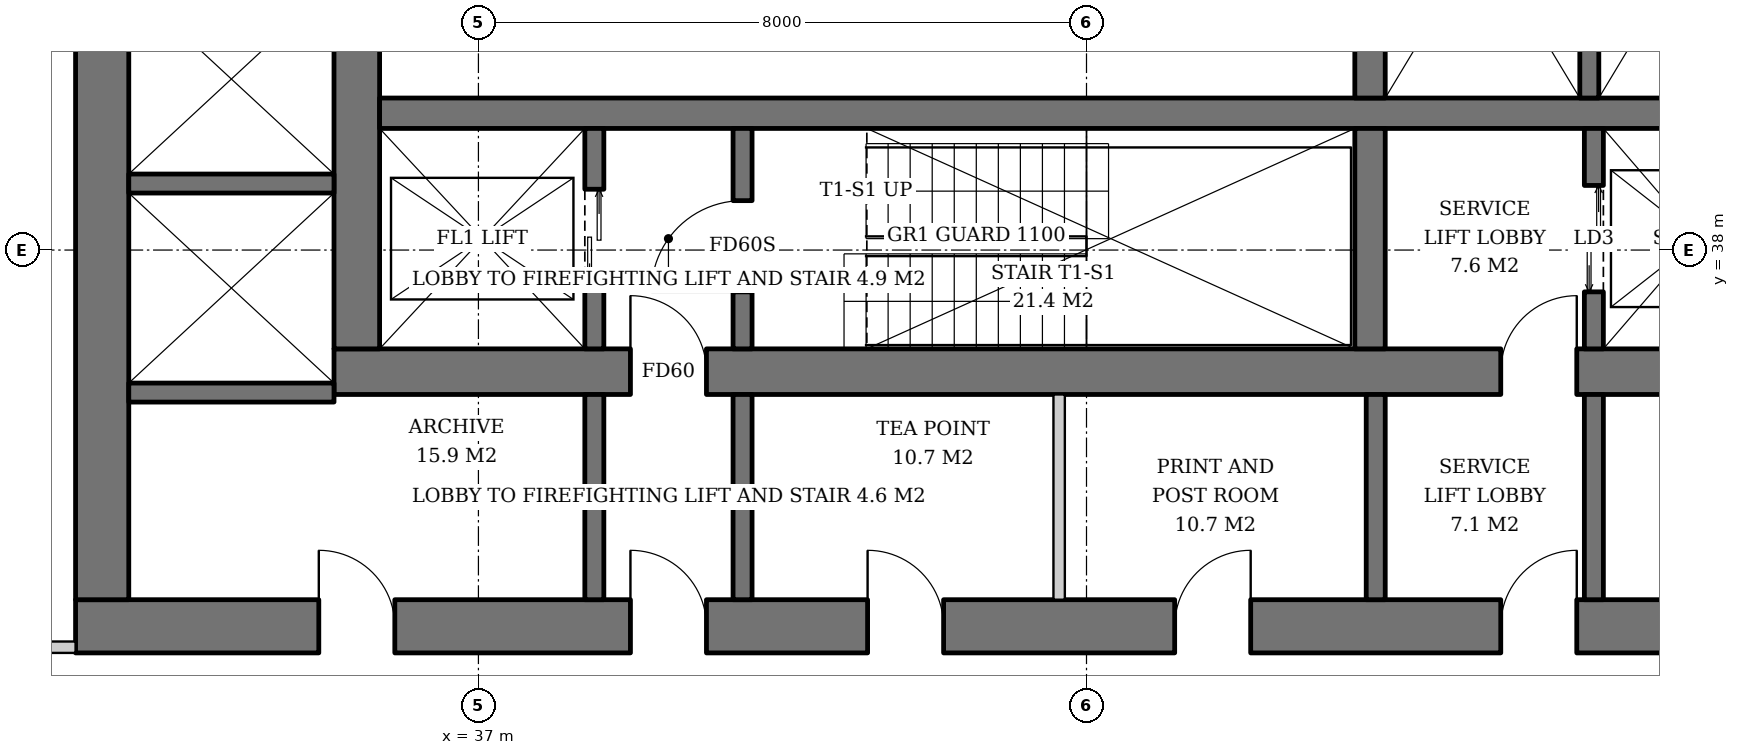
"""IFC4 building model, lengths in metres.
Left out: names, types, materials, properties, quantities, classifications, styles, units other than length and angle.
Written with IfcOpenShell. Run it as: python <this file> out.ifc"""

import sys

from ifc_helpers import new_model, si_unit, direction, frame, frame_2d, origin, place, context, subcontext, project, spatial, rectangle, extrude, element, fill, save


model = new_model("IFC4")
c1 = context("Model", 3, precision=1e-05, world=origin(), true_north=direction((0.0, 1.0)))
c2 = subcontext(c1, "Body", "Model", "MODEL_VIEW")
j1 = project(units=[si_unit("LENGTHUNIT", "METRE"), si_unit("PLANEANGLEUNIT", "RADIAN")], contexts=[c1])
p1 = place(None, origin())
s1 = spatial("IfcSite", under=j1, at=p1, CompositionType="ELEMENT")
p2 = place(p1, origin())
s2 = spatial("IfcBuilding", under=s1, at=p2, CompositionType="ELEMENT")
p3 = place(p2, frame((0.0, 0.0, 97.0)))
s3 = spatial("IfcBuildingStorey", under=s2, at=p3, CompositionType="ELEMENT", Elevation=97.0)
p4 = place(p3, frame((35.1, 36.4, 0.0), z_axis=(0.0, 0.0, 1.0), x_axis=(1.0, 0.0, 0.0)))
e1 = element("IfcWall", 1, at=p4, inside=s3, PredefinedType="SHEAR", context=c2, shape_type="SweptSolid", body=[
    extrude(rectangle(XDim=19.8, YDim=0.6, at=frame_2d((9.9, 0.0))), origin(), (0.0, 0.0, 1.0), 3.8),
])
p5 = place(p4, frame((3.9, 0.0, 0.0)))
e2 = element("IfcOpeningElement", 2, at=p5, cuts=e1, PredefinedType="OPENING", context=c2, shape_type="SweptSolid", body=[
    extrude(rectangle(XDim=1.0, YDim=2.1, at=frame_2d((0.5, 1.05))), frame((0.0, 0.31, 0.0), z_axis=(0.0, -1.0, 0.0), x_axis=(1.0, 0.0, 0.0)), (0.0, 0.0, 1.0), 0.62),
])
p6 = place(p4, frame((15.35, 0.0, 0.0)))
e3 = element("IfcOpeningElement", 3, at=p6, cuts=e1, PredefinedType="OPENING", context=c2, shape_type="SweptSolid", body=[
    extrude(rectangle(XDim=1.0, YDim=2.1, at=frame_2d((0.5, 1.05))), frame((0.0, 0.31, 0.0), z_axis=(0.0, -1.0, 0.0), x_axis=(1.0, 0.0, 0.0)), (0.0, 0.0, 1.0), 0.62),
])
p7 = place(p3, frame((35.4, 36.7, 0.0), z_axis=(0.0, 0.0, 1.0), x_axis=(0.0, 1.0, 0.0)))
e4 = element("IfcWall", 4, at=p7, inside=s3, PredefinedType="SHEAR", context=c2, shape_type="SweptSolid", body=[
    extrude(rectangle(XDim=18.6, YDim=0.6, at=frame_2d((9.3, 0.0))), origin(), (0.0, 0.0, 1.0), 3.8),
])
p8 = place(p7, frame((8.4, 0.0, 0.0)))
e5 = element("IfcOpeningElement", 5, at=p8, cuts=e4, PredefinedType="OPENING", context=c2, shape_type="SweptSolid", body=[
    extrude(rectangle(XDim=1.8, YDim=2.4, at=frame_2d((0.9, 1.2))), frame((0.0, 0.31, 0.0), z_axis=(0.0, -1.0, 0.0), x_axis=(1.0, 0.0, 0.0)), (0.0, 0.0, 1.0), 0.62),
])
p9 = place(p3, frame((31.7, 33.05, 0.0), z_axis=(0.0, 0.0, 1.0), x_axis=(1.0, 0.0, 0.0)))
e6 = element("IfcWall", 6, at=p9, inside=s3, PredefinedType="SHEAR", context=c2, shape_type="SweptSolid", body=[
    extrude(rectangle(XDim=26.6, YDim=0.7, at=frame_2d((13.3, 0.0))), origin(), (0.0, 0.0, 1.0), 3.8),
])
p10 = place(p9, frame((7.3, 0.0, 0.0)))
e7 = element("IfcOpeningElement", 7, at=p10, cuts=e6, PredefinedType="OPENING", context=c2, shape_type="SweptSolid", body=[
    extrude(rectangle(XDim=1.0, YDim=2.1, at=frame_2d((0.5, 1.05))), frame((0.0, 0.36, 0.0), z_axis=(0.0, -1.0, 0.0), x_axis=(1.0, 0.0, 0.0)), (0.0, 0.0, 1.0), 0.72),
])
p11 = place(p9, frame((18.75, 0.0, 0.0)))
e8 = element("IfcOpeningElement", 8, at=p11, cuts=e6, PredefinedType="OPENING", context=c2, shape_type="SweptSolid", body=[
    extrude(rectangle(XDim=1.0, YDim=2.1, at=frame_2d((0.5, 1.05))), frame((0.0, 0.36, 0.0), z_axis=(0.0, -1.0, 0.0), x_axis=(1.0, 0.0, 0.0)), (0.0, 0.0, 1.0), 0.72),
])
p12 = place(p9, frame((3.2, 0.0, 0.0)))
e9 = element("IfcOpeningElement", 9, at=p12, cuts=e6, PredefinedType="OPENING", context=c2, shape_type="SweptSolid", body=[
    extrude(rectangle(XDim=1.0, YDim=2.1, at=frame_2d((0.5, 1.05))), frame((0.0, 0.36, 0.0), z_axis=(0.0, -1.0, 0.0), x_axis=(1.0, 0.0, 0.0)), (0.0, 0.0, 1.0), 0.72),
])
p13 = place(p9, frame((10.42, 0.0, 0.0)))
e10 = element("IfcOpeningElement", 10, at=p13, cuts=e6, PredefinedType="OPENING", context=c2, shape_type="SweptSolid", body=[
    extrude(rectangle(XDim=1.0, YDim=2.1, at=frame_2d((0.5, 1.05))), frame((0.0, 0.36, 0.0), z_axis=(0.0, -1.0, 0.0), x_axis=(1.0, 0.0, 0.0)), (0.0, 0.0, 1.0), 0.72),
])
p14 = place(p9, frame((14.46, 0.0, 0.0)))
e11 = element("IfcOpeningElement", 11, at=p14, cuts=e6, PredefinedType="OPENING", context=c2, shape_type="SweptSolid", body=[
    extrude(rectangle(XDim=1.0, YDim=2.1, at=frame_2d((0.5, 1.05))), frame((0.0, 0.36, 0.0), z_axis=(0.0, -1.0, 0.0), x_axis=(1.0, 0.0, 0.0)), (0.0, 0.0, 1.0), 0.72),
])
p15 = place(p9, frame((22.5, 0.0, 0.0)))
e12 = element("IfcOpeningElement", 12, at=p15, cuts=e6, PredefinedType="OPENING", context=c2, shape_type="SweptSolid", body=[
    extrude(rectangle(XDim=1.0, YDim=2.1, at=frame_2d((0.5, 1.05))), frame((0.0, 0.36, 0.0), z_axis=(0.0, -1.0, 0.0), x_axis=(1.0, 0.0, 0.0)), (0.0, 0.0, 1.0), 0.72),
])
p16 = place(p3, frame((32.05, 33.4, 0.0), z_axis=(0.0, 0.0, 1.0), x_axis=(0.0, 1.0, 0.0)))
e13 = element("IfcWall", 13, at=p16, inside=s3, PredefinedType="SHEAR", context=c2, shape_type="SweptSolid", body=[
    extrude(rectangle(XDim=25.2, YDim=0.7, at=frame_2d((12.6, 0.0))), origin(), (0.0, 0.0, 1.0), 3.8),
])
p17 = place(p16, frame((11.7, 0.0, 0.0)))
e14 = element("IfcOpeningElement", 14, at=p17, cuts=e13, PredefinedType="OPENING", context=c2, shape_type="SweptSolid", body=[
    extrude(rectangle(XDim=1.8, YDim=2.4, at=frame_2d((0.9, 1.2))), frame((0.0, 0.36, 0.0), z_axis=(0.0, -1.0, 0.0), x_axis=(1.0, 0.0, 0.0)), (0.0, 0.0, 1.0), 0.72),
])
p18 = place(p3, frame((35.7, 39.8, 0.0), z_axis=(0.0, 0.0, 1.0), x_axis=(1.0, 0.0, 0.0)))
e15 = element("IfcWall", 15, at=p18, inside=s3, PredefinedType="SHEAR", context=c2, shape_type="SweptSolid", body=[
    extrude(rectangle(XDim=18.6, YDim=0.4, at=frame_2d((9.3, 0.0))), origin(), (0.0, 0.0, 1.0), 3.8),
])
p19 = place(p3, frame((48.73, 36.7, 0.0), z_axis=(0.0, 0.0, 1.0), x_axis=(0.0, 1.0, 0.0)))
e16 = element("IfcWall", 16, at=p19, inside=s3, PredefinedType="SHEAR", context=c2, shape_type="SweptSolid", body=[
    extrude(rectangle(XDim=2.9, YDim=0.4, at=frame_2d((1.45, 0.0))), origin(), (0.0, 0.0, 1.0), 3.8),
])
p20 = place(p3, frame((48.73, 40.0, 0.0), z_axis=(0.0, 0.0, 1.0), x_axis=(0.0, 1.0, 0.0)))
e17 = element("IfcWall", 17, at=p20, inside=s3, PredefinedType="SHEAR", context=c2, shape_type="SweptSolid", body=[
    extrude(rectangle(XDim=12.0, YDim=0.4, at=frame_2d((6.0, 0.0))), origin(), (0.0, 0.0, 1.0), 3.8),
])
p21 = place(p3, frame((38.525, 36.7, 0.0), z_axis=(0.0, 0.0, 1.0), x_axis=(0.0, 1.0, 0.0)))
e18 = element("IfcWall", 18, at=p21, inside=s3, PredefinedType="SHEAR", context=c2, shape_type="SweptSolid", body=[
    extrude(rectangle(XDim=2.9, YDim=0.25, at=frame_2d((1.45, 0.0))), origin(), (0.0, 0.0, 1.0), 3.8),
])
p22 = place(p21, frame((0.8, 0.0, 0.0)))
e19 = element("IfcOpeningElement", 19, at=p22, cuts=e18, PredefinedType="OPENING", context=c2, shape_type="SweptSolid", body=[
    extrude(rectangle(XDim=1.3, YDim=2.2, at=frame_2d((0.65, 1.1))), frame((0.0, 0.135, 0.0), z_axis=(0.0, -1.0, 0.0), x_axis=(1.0, 0.0, 0.0)), (0.0, 0.0, 1.0), 0.27),
])
p23 = place(p3, frame((40.475, 36.7, 0.0), z_axis=(0.0, 0.0, 1.0), x_axis=(0.0, 1.0, 0.0)))
e20 = element("IfcWall", 20, at=p23, inside=s3, PredefinedType="SHEAR", context=c2, shape_type="SweptSolid", body=[
    extrude(rectangle(XDim=2.9, YDim=0.25, at=frame_2d((1.45, 0.0))), origin(), (0.0, 0.0, 1.0), 3.8),
])
p24 = place(p23, frame((0.75, 0.0, 0.0)))
e21 = element("IfcOpeningElement", 21, at=p24, cuts=e20, PredefinedType="OPENING", context=c2, shape_type="SweptSolid", body=[
    extrude(rectangle(XDim=1.2, YDim=2.1, at=frame_2d((0.6, 1.05))), frame((0.0, 0.135, 0.0), z_axis=(0.0, -1.0, 0.0), x_axis=(1.0, 0.0, 0.0)), (0.0, 0.0, 1.0), 0.27),
])
p25 = place(p3, frame((51.675, 36.7, 0.0), z_axis=(0.0, 0.0, 1.0), x_axis=(0.0, 1.0, 0.0)))
e22 = element("IfcWall", 22, at=p25, inside=s3, PredefinedType="SHEAR", context=c2, shape_type="SweptSolid", body=[
    extrude(rectangle(XDim=2.9, YDim=0.25, at=frame_2d((1.45, 0.0))), origin(), (0.0, 0.0, 1.0), 3.8),
])
p26 = place(p25, frame((0.75, 0.0, 0.0)))
e23 = element("IfcOpeningElement", 23, at=p26, cuts=e22, PredefinedType="OPENING", context=c2, shape_type="SweptSolid", body=[
    extrude(rectangle(XDim=1.4, YDim=2.4, at=frame_2d((0.7, 1.2))), frame((0.0, 0.135, 0.0), z_axis=(0.0, -1.0, 0.0), x_axis=(1.0, 0.0, 0.0)), (0.0, 0.0, 1.0), 0.27),
])
p27 = place(p3, frame((51.615, 44.25, 0.0), z_axis=(0.0, 0.0, 1.0), x_axis=(0.0, -1.0, 0.0)))
e24 = element("IfcWall", 24, at=p27, inside=s3, PredefinedType="SHEAR", context=c2, shape_type="SweptSolid", body=[
    extrude(rectangle(XDim=4.25, YDim=0.25, at=frame_2d((2.125, 0.0))), origin(), (0.0, 0.0, 1.0), 3.8),
])
for number, where, z_axis, x_axis in (
    (25, (32.4, 36.125, 0.0), (0.0, 0.0, 1.0), (1.0, 0.0, 0.0)),
    (26, (32.4, 38.875, 0.0), (0.0, 0.0, 1.0), (1.0, 0.0, 0.0)),
):
    element("IfcWall", number, at=place(p3, frame(where, z_axis=z_axis, x_axis=x_axis)), inside=s3, PredefinedType="SHEAR", context=c2, shape_type="SweptSolid", body=[
        extrude(rectangle(XDim=2.7, YDim=0.25, at=frame_2d((1.35, 0.0))), origin(), (0.0, 0.0, 1.0), 3.8),
    ])
for number, where, z_axis, x_axis in (
    (27, (38.525, 33.4, 0.0), (0.0, 0.0, 1.0), (0.0, 1.0, 0.0)),
    (28, (40.475, 33.4, 0.0), (0.0, 0.0, 1.0), (0.0, 1.0, 0.0)),
    (29, (48.805, 33.4, 0.0), (0.0, 0.0, 1.0), (0.0, 1.0, 0.0)),
    (30, (51.675, 33.4, 0.0), (0.0, 0.0, 1.0), (0.0, 1.0, 0.0)),
):
    element("IfcWall", number, at=place(p3, frame(where, z_axis=z_axis, x_axis=x_axis)), inside=s3, PredefinedType="SOLIDWALL", context=c2, shape_type="SweptSolid", body=[
        extrude(rectangle(XDim=2.7, YDim=0.25, at=frame_2d((1.35, 0.0))), origin(), (0.0, 0.0, 1.0), 3.62),
    ])
p28 = place(p3, frame((44.64, 33.4, 0.0), z_axis=(0.0, 0.0, 1.0), x_axis=(0.0, 1.0, 0.0)))
e31 = element("IfcWall", 31, at=p28, inside=s3, PredefinedType="SOLIDWALL", context=c2, shape_type="SweptSolid", body=[
    extrude(rectangle(XDim=2.7, YDim=0.15, at=frame_2d((1.35, 0.0))), origin(), (0.0, 0.0, 1.0), 3.62),
])
p29 = place(p3, frame((31.7, 32.775, 0.0), z_axis=(0.0, 0.0, 1.0), x_axis=(-1.0, 0.0, 0.0)))
e32 = element("IfcWall", 32, at=p29, inside=s3, PredefinedType="PARTITIONING", context=c2, shape_type="SweptSolid", body=[
    extrude(rectangle(XDim=2.325, YDim=0.15, at=frame_2d((1.163, 0.0))), origin(), (0.0, 0.0, 1.0), 3.62),
])
p30 = place(p22, origin())
e33 = element("IfcDoor", 33, at=p30, inside=s3, OperationType="DOUBLE_DOOR_SLIDING", PredefinedType="DOOR", context=c2, shape_type="SweptSolid", body=[
    extrude(rectangle(XDim=1.3, YDim=2.2, at=frame_2d((0.65, 1.1))), frame((0.0, 0.025, 0.0), z_axis=(0.0, -1.0, 0.0), x_axis=(1.0, 0.0, 0.0)), (0.0, 0.0, 1.0), 0.05),
])
fill(e19, e33)
p31 = place(p24, origin())
e34 = element("IfcDoor", 34, at=p31, inside=s3, OperationType="SINGLE_SWING_LEFT", PredefinedType="DOOR", context=c2, shape_type="SweptSolid", body=[
    extrude(rectangle(XDim=1.2, YDim=2.1, at=frame_2d((0.6, 1.05))), frame((0.0, 0.025, 0.0), z_axis=(0.0, -1.0, 0.0), x_axis=(1.0, 0.0, 0.0)), (0.0, 0.0, 1.0), 0.05),
])
fill(e21, e34)
p32 = place(p26, origin())
e35 = element("IfcDoor", 35, at=p32, inside=s3, OperationType="DOUBLE_DOOR_SLIDING", PredefinedType="DOOR", context=c2, shape_type="SweptSolid", body=[
    extrude(rectangle(XDim=1.4, YDim=2.4, at=frame_2d((0.7, 1.2))), frame((0.0, 0.025, 0.0), z_axis=(0.0, -1.0, 0.0), x_axis=(1.0, 0.0, 0.0)), (0.0, 0.0, 1.0), 0.05),
])
fill(e23, e35)
p33 = place(p5, origin())
e36 = element("IfcDoor", 36, at=p33, inside=s3, OperationType="SINGLE_SWING_LEFT", PredefinedType="DOOR", context=c2, shape_type="SweptSolid", body=[
    extrude(rectangle(XDim=1.0, YDim=2.1, at=frame_2d((0.5, 1.05))), frame((0.0, 0.025, 0.0), z_axis=(0.0, -1.0, 0.0), x_axis=(1.0, 0.0, 0.0)), (0.0, 0.0, 1.0), 0.05),
])
fill(e2, e36)
p34 = place(p6, origin())
e37 = element("IfcDoor", 37, at=p34, inside=s3, OperationType="SINGLE_SWING_RIGHT", PredefinedType="DOOR", context=c2, shape_type="SweptSolid", body=[
    extrude(rectangle(XDim=1.0, YDim=2.1, at=frame_2d((0.5, 1.05))), frame((0.0, 0.025, 0.0), z_axis=(0.0, -1.0, 0.0), x_axis=(1.0, 0.0, 0.0)), (0.0, 0.0, 1.0), 0.05),
])
fill(e3, e37)
p35 = place(p10, origin())
e38 = element("IfcDoor", 38, at=p35, inside=s3, OperationType="SINGLE_SWING_LEFT", PredefinedType="DOOR", context=c2, shape_type="SweptSolid", body=[
    extrude(rectangle(XDim=1.0, YDim=2.1, at=frame_2d((0.5, 1.05))), frame((0.0, 0.025, 0.0), z_axis=(0.0, -1.0, 0.0), x_axis=(1.0, 0.0, 0.0)), (0.0, 0.0, 1.0), 0.05),
])
fill(e7, e38)
p36 = place(p11, origin())
e39 = element("IfcDoor", 39, at=p36, inside=s3, OperationType="SINGLE_SWING_RIGHT", PredefinedType="DOOR", context=c2, shape_type="SweptSolid", body=[
    extrude(rectangle(XDim=1.0, YDim=2.1, at=frame_2d((0.5, 1.05))), frame((0.0, 0.025, 0.0), z_axis=(0.0, -1.0, 0.0), x_axis=(1.0, 0.0, 0.0)), (0.0, 0.0, 1.0), 0.05),
])
fill(e8, e39)
p37 = place(p12, origin())
e40 = element("IfcDoor", 40, at=p37, inside=s3, OperationType="SINGLE_SWING_LEFT", PredefinedType="DOOR", context=c2, shape_type="SweptSolid", body=[
    extrude(rectangle(XDim=1.0, YDim=2.1, at=frame_2d((0.5, 1.05))), frame((0.0, 0.34, 0.0), z_axis=(0.0, -1.0, 0.0), x_axis=(1.0, 0.0, 0.0)), (0.0, 0.0, 1.0), 0.05),
])
fill(e9, e40)
p38 = place(p13, origin())
e41 = element("IfcDoor", 41, at=p38, inside=s3, OperationType="SINGLE_SWING_LEFT", PredefinedType="DOOR", context=c2, shape_type="SweptSolid", body=[
    extrude(rectangle(XDim=1.0, YDim=2.1, at=frame_2d((0.5, 1.05))), frame((0.0, 0.34, 0.0), z_axis=(0.0, -1.0, 0.0), x_axis=(1.0, 0.0, 0.0)), (0.0, 0.0, 1.0), 0.05),
])
fill(e10, e41)
p39 = place(p14, origin())
e42 = element("IfcDoor", 42, at=p39, inside=s3, OperationType="SINGLE_SWING_RIGHT", PredefinedType="DOOR", context=c2, shape_type="SweptSolid", body=[
    extrude(rectangle(XDim=1.0, YDim=2.1, at=frame_2d((0.5, 1.05))), frame((0.0, 0.34, 0.0), z_axis=(0.0, -1.0, 0.0), x_axis=(1.0, 0.0, 0.0)), (0.0, 0.0, 1.0), 0.05),
])
fill(e11, e42)
save(model, sys.argv[1])
